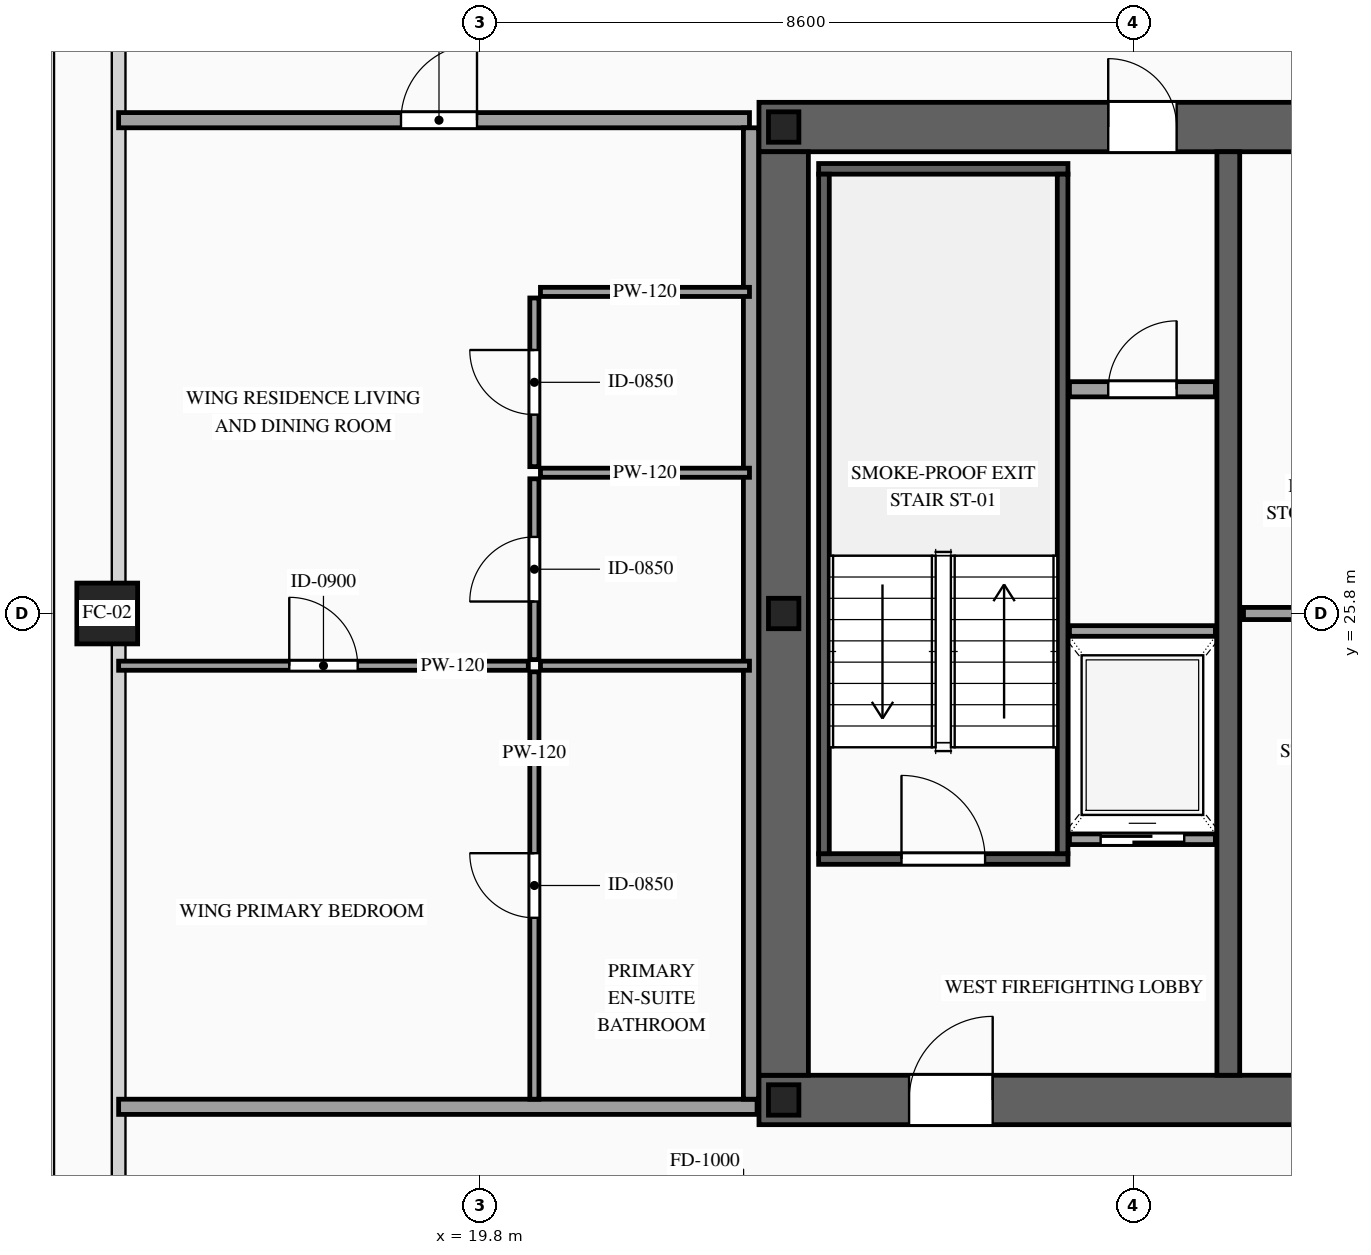
"""IFC4 building model, lengths in metres.
Left out: names, types, materials, properties, quantities, classifications, styles, units other than length and angle.
Written with IfcOpenShell. Run it as: python <this file> out.ifc"""

import sys

from ifc_helpers import new_model, si_unit, direction, frame, frame_2d, origin, origin_2d, place, context, subcontext, project, spatial, rectangle, hollow_rectangle, i_section, extrude, source, transform, mapped, element, fill, save


model = new_model("IFC4")
c1 = context("Model", 3, precision=1e-05, world=origin(), true_north=direction((0.0, 1.0)))
c2 = subcontext(c1, "Body", "Model", "MODEL_VIEW")
j1 = project(units=[si_unit("LENGTHUNIT", "METRE"), si_unit("PLANEANGLEUNIT", "RADIAN")], contexts=[c1])
p1 = place(None, origin())
s1 = spatial("IfcSite", under=j1, at=p1, CompositionType="ELEMENT")
p2 = place(p1, origin())
s2 = spatial("IfcBuilding", under=s1, at=p2, CompositionType="ELEMENT")
p3 = place(p2, frame((0.0, 0.0, 188.0)))
s3 = spatial("IfcBuildingStorey", under=s2, at=p3, CompositionType="ELEMENT", Elevation=188.0)
p4 = place(p3, frame((23.475, 19.4, 0.0), z_axis=(0.0, 0.0, 1.0), x_axis=(1.0, 0.0, 0.0)))
e1 = element("IfcWall", 1, at=p4, inside=s3, PredefinedType="SHEAR", context=c2, shape_type="SweptSolid", body=[
    extrude(rectangle(XDim=27.05, YDim=0.65, at=frame_2d((13.525, 0.0))), origin(), (0.0, 0.0, 1.0), 3.5),
])
p5 = place(p4, frame((1.975, 0.0, 0.0)))
e2 = element("IfcOpeningElement", 2, at=p5, cuts=e1, PredefinedType="OPENING", context=c2, shape_type="SweptSolid", body=[
    extrude(rectangle(XDim=1.1, YDim=2.2, at=frame_2d((0.55, 1.1))), frame((0.0, 0.34, 0.0), z_axis=(0.0, -1.0, 0.0), x_axis=(1.0, 0.0, 0.0)), (0.0, 0.0, 1.0), 0.68),
])
p6 = place(p4, frame((9.875, 0.0, 0.0)))
e3 = element("IfcOpeningElement", 3, at=p6, cuts=e1, PredefinedType="OPENING", context=c2, shape_type="SweptSolid", body=[
    extrude(rectangle(XDim=1.1, YDim=2.2, at=frame_2d((0.55, 1.1))), frame((0.0, 0.34, 0.0), z_axis=(0.0, -1.0, 0.0), x_axis=(1.0, 0.0, 0.0)), (0.0, 0.0, 1.0), 0.68),
])
p7 = place(p4, frame((23.075, 0.0, 0.0)))
e4 = element("IfcOpeningElement", 4, at=p7, cuts=e1, PredefinedType="OPENING", context=c2, shape_type="SweptSolid", body=[
    extrude(rectangle(XDim=1.1, YDim=2.2, at=frame_2d((0.55, 1.1))), frame((0.0, 0.34, 0.0), z_axis=(0.0, -1.0, 0.0), x_axis=(1.0, 0.0, 0.0)), (0.0, 0.0, 1.0), 0.68),
])
p8 = place(p4, frame((19.695, 0.0, 0.0)))
e5 = element("IfcOpeningElement", 5, at=p8, cuts=e1, PredefinedType="OPENING", context=c2, shape_type="SweptSolid", body=[
    extrude(rectangle(XDim=0.9, YDim=2.15, at=frame_2d((0.45, 1.075))), frame((0.0, 0.34, 0.0), z_axis=(0.0, -1.0, 0.0), x_axis=(1.0, 0.0, 0.0)), (0.0, 0.0, 1.0), 0.68),
])
p9 = place(p4, frame((18.255, 0.0, 0.0)))
e6 = element("IfcOpeningElement", 6, at=p9, cuts=e1, PredefinedType="OPENING", context=c2, shape_type="SweptSolid", body=[
    extrude(rectangle(XDim=0.9, YDim=2.15, at=frame_2d((0.45, 1.075))), frame((0.0, 0.34, 0.0), z_axis=(0.0, -1.0, 0.0), x_axis=(1.0, 0.0, 0.0)), (0.0, 0.0, 1.0), 0.68),
])
p10 = place(p3, frame((23.475, 32.2, 0.0), z_axis=(0.0, 0.0, 1.0), x_axis=(1.0, 0.0, 0.0)))
e7 = element("IfcWall", 7, at=p10, inside=s3, PredefinedType="SHEAR", context=c2, shape_type="SweptSolid", body=[
    extrude(rectangle(XDim=27.05, YDim=0.65, at=frame_2d((13.525, 0.0))), origin(), (0.0, 0.0, 1.0), 3.5),
])
p11 = place(p10, frame((4.595, 0.0, 0.0)))
e8 = element("IfcOpeningElement", 8, at=p11, cuts=e7, PredefinedType="OPENING", context=c2, shape_type="SweptSolid", body=[
    extrude(rectangle(XDim=0.9, YDim=2.15, at=frame_2d((0.45, 1.075))), frame((0.0, 0.34, 0.0), z_axis=(0.0, -1.0, 0.0), x_axis=(1.0, 0.0, 0.0)), (0.0, 0.0, 1.0), 0.68),
])
p12 = place(p10, frame((9.875, 0.0, 0.0)))
e9 = element("IfcOpeningElement", 9, at=p12, cuts=e7, PredefinedType="OPENING", context=c2, shape_type="SweptSolid", body=[
    extrude(rectangle(XDim=1.1, YDim=2.2, at=frame_2d((0.55, 1.1))), frame((0.0, 0.34, 0.0), z_axis=(0.0, -1.0, 0.0), x_axis=(1.0, 0.0, 0.0)), (0.0, 0.0, 1.0), 0.68),
])
p13 = place(p10, frame((15.725, 0.0, 0.0)))
e10 = element("IfcOpeningElement", 10, at=p13, cuts=e7, PredefinedType="OPENING", context=c2, shape_type="SweptSolid", body=[
    extrude(rectangle(XDim=1.1, YDim=2.2, at=frame_2d((0.55, 1.1))), frame((0.0, 0.34, 0.0), z_axis=(0.0, -1.0, 0.0), x_axis=(1.0, 0.0, 0.0)), (0.0, 0.0, 1.0), 0.68),
])
p14 = place(p10, frame((19.695, 0.0, 0.0)))
e11 = element("IfcOpeningElement", 11, at=p14, cuts=e7, PredefinedType="OPENING", context=c2, shape_type="SweptSolid", body=[
    extrude(rectangle(XDim=0.9, YDim=2.15, at=frame_2d((0.45, 1.075))), frame((0.0, 0.34, 0.0), z_axis=(0.0, -1.0, 0.0), x_axis=(1.0, 0.0, 0.0)), (0.0, 0.0, 1.0), 0.68),
])
m1 = source(origin(), c2, "Body", "SweptSolid", [
    extrude(rectangle(XDim=12.15, YDim=0.65, at=frame_2d((6.075, 0.0))), origin(), (0.0, 0.0, 1.0), 3.5),
])
p15 = place(p3, frame((23.8, 19.725, 0.0), z_axis=(0.0, 0.0, 1.0), x_axis=(0.0, 1.0, 0.0)))
e12 = element("IfcWall", 12, at=p15, inside=s3, PredefinedType="SHEAR", context=c2, shape_type="MappedRepresentation", body=[
    mapped(m1, transform((0.0, 0.0, 0.0), scale=1.0)),
])
m2 = source(origin(), c2, "Body", "SweptSolid", [
    extrude(rectangle(XDim=12.15, YDim=0.3, at=frame_2d((6.075, 0.0))), origin(), (0.0, 0.0, 1.0), 3.5),
])
p16 = place(p3, frame((29.65, 19.725, 0.0), z_axis=(0.0, 0.0, 1.0), x_axis=(0.0, 1.0, 0.0)))
e13 = element("IfcWall", 13, at=p16, inside=s3, PredefinedType="SOLIDWALL", context=c2, shape_type="MappedRepresentation", body=[
    mapped(m2, transform((0.0, 0.0, 0.0), scale=1.0)),
])
m3 = source(origin(), c2, "Body", "SweptSolid", [
    extrude(i_section(OverallWidth=0.4, OverallDepth=0.4, WebThickness=0.013, FlangeThickness=0.021, at=origin_2d()), origin(), (0.0, 0.0, 1.0), 3.5),
])
for number, where, z_axis, x_axis in (
    (14, (23.8, 19.4, 0.0), (0.0, 0.0, 1.0), (1.0, 0.0, 0.0)),
    (15, (23.8, 25.8, 0.0), (0.0, 0.0, 1.0), (1.0, 0.0, 0.0)),
    (16, (23.8, 32.2, 0.0), (0.0, 0.0, 1.0), (1.0, 0.0, 0.0)),
):
    element("IfcColumn", number, at=place(p3, frame(where, z_axis=z_axis, x_axis=x_axis)), inside=s3, PredefinedType="COLUMN", context=c2, shape_type="MappedRepresentation", body=[
        mapped(m3, transform((0.0, 0.0, 0.0), scale=1.0)),
    ])
m4 = source(origin(), c2, "Body", "SweptSolid", [
    extrude(hollow_rectangle(XDim=0.8, YDim=0.8, WallThickness=0.036, at=origin_2d()), origin(), (0.0, 0.0, 1.0), 3.5),
])
p17 = place(p3, frame((14.9, 25.8, 0.0), z_axis=(0.0, 0.0, 1.0), x_axis=(1.0, 0.0, 0.0)))
e17 = element("IfcColumn", 17, at=p17, inside=s3, PredefinedType="COLUMN", context=c2, shape_type="MappedRepresentation", body=[
    mapped(m4, transform((0.0, 0.0, 0.0), scale=1.0)),
])
p18 = place(p3, frame((27.56, 22.83, 0.0), z_axis=(0.0, 0.0, 1.0), x_axis=(1.0, 0.0, 0.0)))
e18 = element("IfcWall", 18, at=p18, inside=s3, PredefinedType="SOLIDWALL", context=c2, shape_type="SweptSolid", body=[
    extrude(rectangle(XDim=1.92, YDim=0.14, at=frame_2d((0.96, 0.0))), origin(), (0.0, 0.0, 1.0), 3.28),
])
p19 = place(p18, frame((0.41, 0.0, 0.0)))
e19 = element("IfcOpeningElement", 19, at=p19, cuts=e18, PredefinedType="OPENING", context=c2, shape_type="SweptSolid", body=[
    extrude(rectangle(XDim=1.1, YDim=2.2, at=frame_2d((0.55, 1.1))), frame((0.0, 0.085, 0.0), z_axis=(0.0, -1.0, 0.0), x_axis=(1.0, 0.0, 0.0)), (0.0, 0.0, 1.0), 0.17),
])
m5 = source(origin(), c2, "Body", "SweptSolid", [
    extrude(rectangle(XDim=1.92, YDim=0.14, at=frame_2d((0.96, 0.0))), origin(), (0.0, 0.0, 1.0), 3.28),
])
p20 = place(p3, frame((27.56, 25.57, 0.0), z_axis=(0.0, 0.0, 1.0), x_axis=(1.0, 0.0, 0.0)))
e20 = element("IfcWall", 20, at=p20, inside=s3, PredefinedType="SOLIDWALL", context=c2, shape_type="MappedRepresentation", body=[
    mapped(m5, transform((0.0, 0.0, 0.0), scale=1.0)),
])
p21 = place(p3, frame((24.26, 22.57, 0.0), z_axis=(0.0, 0.0, 1.0), x_axis=(1.0, 0.0, 0.0)))
e21 = element("IfcWall", 21, at=p21, inside=s3, PredefinedType="SOLIDWALL", context=c2, shape_type="SweptSolid", body=[
    extrude(rectangle(XDim=3.28, YDim=0.14, at=frame_2d((1.64, 0.0))), origin(), (0.0, 0.0, 1.0), 3.28),
])
p22 = place(p21, frame((1.09, 0.0, 0.0)))
e22 = element("IfcOpeningElement", 22, at=p22, cuts=e21, PredefinedType="OPENING", context=c2, shape_type="SweptSolid", body=[
    extrude(rectangle(XDim=1.1, YDim=2.2, at=frame_2d((0.55, 1.1))), frame((0.0, 0.085, 0.0), z_axis=(0.0, -1.0, 0.0), x_axis=(1.0, 0.0, 0.0)), (0.0, 0.0, 1.0), 0.17),
])
m6 = source(origin(), c2, "Body", "SweptSolid", [
    extrude(rectangle(XDim=3.28, YDim=0.14, at=frame_2d((1.64, 0.0))), origin(), (0.0, 0.0, 1.0), 3.28),
])
p23 = place(p3, frame((24.26, 31.65, 0.0), z_axis=(0.0, 0.0, 1.0), x_axis=(1.0, 0.0, 0.0)))
e23 = element("IfcWall", 23, at=p23, inside=s3, PredefinedType="SOLIDWALL", context=c2, shape_type="MappedRepresentation", body=[
    mapped(m6, transform((0.0, 0.0, 0.0), scale=1.0)),
])
m7 = source(origin(), c2, "Body", "SweptSolid", [
    extrude(rectangle(XDim=8.94, YDim=0.14, at=frame_2d((4.47, 0.0))), origin(), (0.0, 0.0, 1.0), 3.28),
])
for number, where, z_axis, x_axis in (
    (24, (24.33, 22.64, 0.0), (0.0, 0.0, 1.0), (0.0, 1.0, 0.0)),
    (25, (27.47, 22.64, 0.0), (0.0, 0.0, 1.0), (0.0, 1.0, 0.0)),
):
    element("IfcWall", number, at=place(p3, frame(where, z_axis=z_axis, x_axis=x_axis)), inside=s3, PredefinedType="SOLIDWALL", context=c2, shape_type="MappedRepresentation", body=[
        mapped(m7, transform((0.0, 0.0, 0.0), scale=1.0)),
    ])
p24 = place(p3, frame((27.56, 28.75, 0.0), z_axis=(0.0, 0.0, 1.0), x_axis=(1.0, 0.0, 0.0)))
e26 = element("IfcWall", 26, at=p24, inside=s3, PredefinedType="PARTITIONING", context=c2, shape_type="SweptSolid", body=[
    extrude(rectangle(XDim=1.92, YDim=0.2, at=frame_2d((0.96, 0.0))), origin(), (0.0, 0.0, 1.0), 3.28),
])
p25 = place(p24, frame((0.51, 0.0, 0.0)))
e27 = element("IfcOpeningElement", 27, at=p25, cuts=e26, PredefinedType="OPENING", context=c2, shape_type="SweptSolid", body=[
    extrude(rectangle(XDim=0.9, YDim=2.15, at=frame_2d((0.45, 1.075))), frame((0.0, 0.115, 0.0), z_axis=(0.0, -1.0, 0.0), x_axis=(1.0, 0.0, 0.0)), (0.0, 0.0, 1.0), 0.23),
])
m8 = source(origin(), c2, "Body", "SweptSolid", [
    extrude(rectangle(XDim=2.47, YDim=0.16, at=frame_2d((1.235, 0.0))), origin(), (0.0, 0.0, 1.0), 3.28),
])
p26 = place(p3, frame((29.85, 25.8, 0.0), z_axis=(0.0, 0.0, 1.0), x_axis=(1.0, 0.0, 0.0)))
e28 = element("IfcWall", 28, at=p26, inside=s3, PredefinedType="PARTITIONING", context=c2, shape_type="MappedRepresentation", body=[
    mapped(m8, transform((0.0, 0.0, 0.0), scale=1.0)),
])
p27 = place(p3, frame((15.05, 32.29, 0.0), z_axis=(0.0, 0.0, 1.0), x_axis=(1.0, 0.0, 0.0)))
e29 = element("IfcWall", 29, at=p27, inside=s3, PredefinedType="PARTITIONING", context=c2, shape_type="SweptSolid", body=[
    extrude(rectangle(XDim=8.3, YDim=0.2, at=frame_2d((4.15, 0.0))), origin(), (0.0, 0.0, 1.0), 2.775),
])
p28 = place(p27, frame((3.715, 0.0, 0.0)))
e30 = element("IfcOpeningElement", 30, at=p28, cuts=e29, PredefinedType="OPENING", context=c2, shape_type="SweptSolid", body=[
    extrude(rectangle(XDim=1.0, YDim=2.2, at=frame_2d((0.5, 1.1))), frame((0.0, 0.115, 0.0), z_axis=(0.0, -1.0, 0.0), x_axis=(1.0, 0.0, 0.0)), (0.0, 0.0, 1.0), 0.23),
])
m9 = source(origin(), c2, "Body", "SweptSolid", [
    extrude(rectangle(XDim=8.4, YDim=0.2, at=frame_2d((4.2, 0.0))), origin(), (0.0, 0.0, 1.0), 2.775),
])
p29 = place(p3, frame((15.05, 19.31, 0.0), z_axis=(0.0, 0.0, 1.0), x_axis=(1.0, 0.0, 0.0)))
e31 = element("IfcWall", 31, at=p29, inside=s3, PredefinedType="PARTITIONING", context=c2, shape_type="MappedRepresentation", body=[
    mapped(m9, transform((0.0, 0.0, 0.0), scale=1.0)),
])
m10 = source(origin(), c2, "Body", "SweptSolid", [
    extrude(rectangle(XDim=12.78, YDim=0.2, at=frame_2d((6.39, 0.0))), origin(), (0.0, 0.0, 1.0), 3.28),
])
p30 = place(p3, frame((23.37, 19.41, 0.0), z_axis=(0.0, 0.0, 1.0), x_axis=(0.0, 1.0, 0.0)))
e32 = element("IfcWall", 32, at=p30, inside=s3, PredefinedType="PARTITIONING", context=c2, shape_type="MappedRepresentation", body=[
    mapped(m10, transform((0.0, 0.0, 0.0), scale=1.0)),
])
m11 = source(origin(), c2, "Body", "SweptSolid", [
    extrude(rectangle(XDim=2.75, YDim=0.12, at=frame_2d((1.375, 0.0))), origin(), (0.0, 0.0, 1.0), 3.28),
])
for number, where, z_axis, x_axis in (
    (33, (20.6, 25.113, 0.0), (0.0, 0.0, 1.0), (1.0, 0.0, 0.0)),
    (34, (20.6, 27.652, 0.0), (0.0, 0.0, 1.0), (1.0, 0.0, 0.0)),
):
    element("IfcWall", number, at=place(p3, frame(where, z_axis=z_axis, x_axis=x_axis)), inside=s3, PredefinedType="PARTITIONING", context=c2, shape_type="MappedRepresentation", body=[
        mapped(m11, transform((0.0, 0.0, 0.0), scale=1.0)),
    ])
p31 = place(p3, frame((20.52, 25.193, 0.0), z_axis=(0.0, 0.0, 1.0), x_axis=(0.0, 1.0, 0.0)))
e35 = element("IfcWall", 35, at=p31, inside=s3, PredefinedType="PARTITIONING", context=c2, shape_type="SweptSolid", body=[
    extrude(rectangle(XDim=2.379, YDim=0.12, at=frame_2d((1.189, 0.0))), origin(), (0.0, 0.0, 1.0), 3.28),
])
p32 = place(p31, frame((0.764, 0.0, 0.0)))
e36 = element("IfcOpeningElement", 36, at=p32, cuts=e35, PredefinedType="OPENING", context=c2, shape_type="SweptSolid", body=[
    extrude(rectangle(XDim=0.85, YDim=2.1, at=frame_2d((0.425, 1.05))), frame((0.0, 0.075, 0.0), z_axis=(0.0, -1.0, 0.0), x_axis=(1.0, 0.0, 0.0)), (0.0, 0.0, 1.0), 0.15),
])
p33 = place(p3, frame((20.6, 30.031, 0.0), z_axis=(0.0, 0.0, 1.0), x_axis=(1.0, 0.0, 0.0)))
e37 = element("IfcWall", 37, at=p33, inside=s3, PredefinedType="PARTITIONING", context=c2, shape_type="MappedRepresentation", body=[
    mapped(m11, transform((0.0, 0.0, 0.0), scale=1.0)),
])
p34 = place(p3, frame((20.52, 27.732, 0.0), z_axis=(0.0, 0.0, 1.0), x_axis=(0.0, 1.0, 0.0)))
e38 = element("IfcWall", 38, at=p34, inside=s3, PredefinedType="PARTITIONING", context=c2, shape_type="SweptSolid", body=[
    extrude(rectangle(XDim=2.219, YDim=0.12, at=frame_2d((1.109, 0.0))), origin(), (0.0, 0.0, 1.0), 3.28),
])
p35 = place(p34, frame((0.685, 0.0, 0.0)))
e39 = element("IfcOpeningElement", 39, at=p35, cuts=e38, PredefinedType="OPENING", context=c2, shape_type="SweptSolid", body=[
    extrude(rectangle(XDim=0.85, YDim=2.1, at=frame_2d((0.425, 1.05))), frame((0.0, 0.075, 0.0), z_axis=(0.0, -1.0, 0.0), x_axis=(1.0, 0.0, 0.0)), (0.0, 0.0, 1.0), 0.15),
])
p36 = place(p3, frame((15.05, 25.113, 0.0), z_axis=(0.0, 0.0, 1.0), x_axis=(1.0, 0.0, 0.0)))
e40 = element("IfcWall", 40, at=p36, inside=s3, PredefinedType="PARTITIONING", context=c2, shape_type="SweptSolid", body=[
    extrude(rectangle(XDim=5.39, YDim=0.12, at=frame_2d((2.695, 0.0))), origin(), (0.0, 0.0, 1.0), 3.28),
])
p37 = place(p36, frame((2.245, 0.0, 0.0)))
e41 = element("IfcOpeningElement", 41, at=p37, cuts=e40, PredefinedType="OPENING", context=c2, shape_type="SweptSolid", body=[
    extrude(rectangle(XDim=0.9, YDim=2.15, at=frame_2d((0.45, 1.075))), frame((0.0, 0.075, 0.0), z_axis=(0.0, -1.0, 0.0), x_axis=(1.0, 0.0, 0.0)), (0.0, 0.0, 1.0), 0.15),
])
p38 = place(p3, frame((20.52, 19.41, 0.0), z_axis=(0.0, 0.0, 1.0), x_axis=(0.0, 1.0, 0.0)))
e42 = element("IfcWall", 42, at=p38, inside=s3, PredefinedType="PARTITIONING", context=c2, shape_type="SweptSolid", body=[
    extrude(rectangle(XDim=5.623, YDim=0.12, at=frame_2d((2.812, 0.0))), origin(), (0.0, 0.0, 1.0), 3.28),
])
p39 = place(p38, frame((2.386, 0.0, 0.0)))
e43 = element("IfcOpeningElement", 43, at=p39, cuts=e42, PredefinedType="OPENING", context=c2, shape_type="SweptSolid", body=[
    extrude(rectangle(XDim=0.85, YDim=2.1, at=frame_2d((0.425, 1.05))), frame((0.0, 0.075, 0.0), z_axis=(0.0, -1.0, 0.0), x_axis=(1.0, 0.0, 0.0)), (0.0, 0.0, 1.0), 0.15),
])
m12 = source(origin(), c2, "Body", "SweptSolid", [
    extrude(rectangle(XDim=1.1, YDim=2.2, at=frame_2d((0.55, 1.1))), frame((0.0, 0.025, 0.0), z_axis=(0.0, -1.0, 0.0), x_axis=(1.0, 0.0, 0.0)), (0.0, 0.0, 1.0), 0.05),
])
p40 = place(p19, origin())
e44 = element("IfcDoor", 44, at=p40, inside=s3, OperationType="SLIDING_TO_LEFT", PredefinedType="DOOR", context=c2, shape_type="MappedRepresentation", body=[
    mapped(m12, transform((0.0, 0.0, 0.0), scale=1.0)),
])
fill(e19, e44)
m13 = source(origin(), c2, "Body", "SweptSolid", [
    extrude(rectangle(XDim=1.1, YDim=2.2, at=frame_2d((0.55, 1.1))), frame((0.0, 0.025, 0.0), z_axis=(0.0, -1.0, 0.0), x_axis=(1.0, 0.0, 0.0)), (0.0, 0.0, 1.0), 0.05),
])
p41 = place(p22, origin())
e45 = element("IfcDoor", 45, at=p41, inside=s3, OperationType="SINGLE_SWING_LEFT", PredefinedType="DOOR", context=c2, shape_type="MappedRepresentation", body=[
    mapped(m13, transform((0.0, 0.0, 0.0), scale=1.0)),
])
fill(e22, e45)
p42 = place(p5, origin())
e46 = element("IfcDoor", 46, at=p42, inside=s3, OperationType="SINGLE_SWING_RIGHT", PredefinedType="DOOR", context=c2, shape_type="MappedRepresentation", body=[
    mapped(m13, transform((0.0, 0.0, 0.0), scale=1.0)),
])
fill(e2, e46)
m14 = source(origin(), c2, "Body", "SweptSolid", [
    extrude(rectangle(XDim=0.9, YDim=2.15, at=frame_2d((0.45, 1.075))), frame((0.0, 0.025, 0.0), z_axis=(0.0, -1.0, 0.0), x_axis=(1.0, 0.0, 0.0)), (0.0, 0.0, 1.0), 0.05),
])
p43 = place(p11, origin())
e47 = element("IfcDoor", 47, at=p43, inside=s3, OperationType="SINGLE_SWING_LEFT", PredefinedType="DOOR", context=c2, shape_type="MappedRepresentation", body=[
    mapped(m14, transform((0.0, 0.0, 0.0), scale=1.0)),
])
fill(e8, e47)
p44 = place(p25, origin())
e48 = element("IfcDoor", 48, at=p44, inside=s3, OperationType="SINGLE_SWING_RIGHT", PredefinedType="DOOR", context=c2, shape_type="MappedRepresentation", body=[
    mapped(m14, transform((0.0, 0.0, 0.0), scale=1.0)),
])
fill(e27, e48)
m15 = source(origin(), c2, "Body", "SweptSolid", [
    extrude(rectangle(XDim=1.0, YDim=2.2, at=frame_2d((0.5, 1.1))), frame((0.0, 0.025, 0.0), z_axis=(0.0, -1.0, 0.0), x_axis=(1.0, 0.0, 0.0)), (0.0, 0.0, 1.0), 0.05),
])
p45 = place(p28, origin())
e49 = element("IfcDoor", 49, at=p45, inside=s3, OperationType="SINGLE_SWING_RIGHT", PredefinedType="DOOR", context=c2, shape_type="MappedRepresentation", body=[
    mapped(m15, transform((0.0, 0.0, 0.0), scale=1.0)),
])
fill(e30, e49)
m16 = source(origin(), c2, "Body", "SweptSolid", [
    extrude(rectangle(XDim=0.85, YDim=2.1, at=frame_2d((0.425, 1.05))), frame((0.0, 0.025, 0.0), z_axis=(0.0, -1.0, 0.0), x_axis=(1.0, 0.0, 0.0)), (0.0, 0.0, 1.0), 0.05),
])
p46 = place(p32, origin())
e50 = element("IfcDoor", 50, at=p46, inside=s3, OperationType="SINGLE_SWING_LEFT", PredefinedType="DOOR", context=c2, shape_type="MappedRepresentation", body=[
    mapped(m16, transform((0.0, 0.0, 0.0), scale=1.0)),
])
fill(e36, e50)
p47 = place(p35, origin())
e51 = element("IfcDoor", 51, at=p47, inside=s3, OperationType="SINGLE_SWING_RIGHT", PredefinedType="DOOR", context=c2, shape_type="MappedRepresentation", body=[
    mapped(m16, transform((0.0, 0.0, 0.0), scale=1.0)),
])
fill(e39, e51)
m17 = source(origin(), c2, "Body", "SweptSolid", [
    extrude(rectangle(XDim=0.9, YDim=2.15, at=frame_2d((0.45, 1.075))), frame((0.0, 0.025, 0.0), z_axis=(0.0, -1.0, 0.0), x_axis=(1.0, 0.0, 0.0)), (0.0, 0.0, 1.0), 0.05),
])
p48 = place(p37, origin())
e52 = element("IfcDoor", 52, at=p48, inside=s3, OperationType="SINGLE_SWING_LEFT", PredefinedType="DOOR", context=c2, shape_type="MappedRepresentation", body=[
    mapped(m17, transform((0.0, 0.0, 0.0), scale=1.0)),
])
fill(e41, e52)
p49 = place(p39, origin())
e53 = element("IfcDoor", 53, at=p49, inside=s3, OperationType="SINGLE_SWING_RIGHT", PredefinedType="DOOR", context=c2, shape_type="MappedRepresentation", body=[
    mapped(m16, transform((0.0, 0.0, 0.0), scale=1.0)),
])
fill(e43, e53)
save(model, sys.argv[1])
